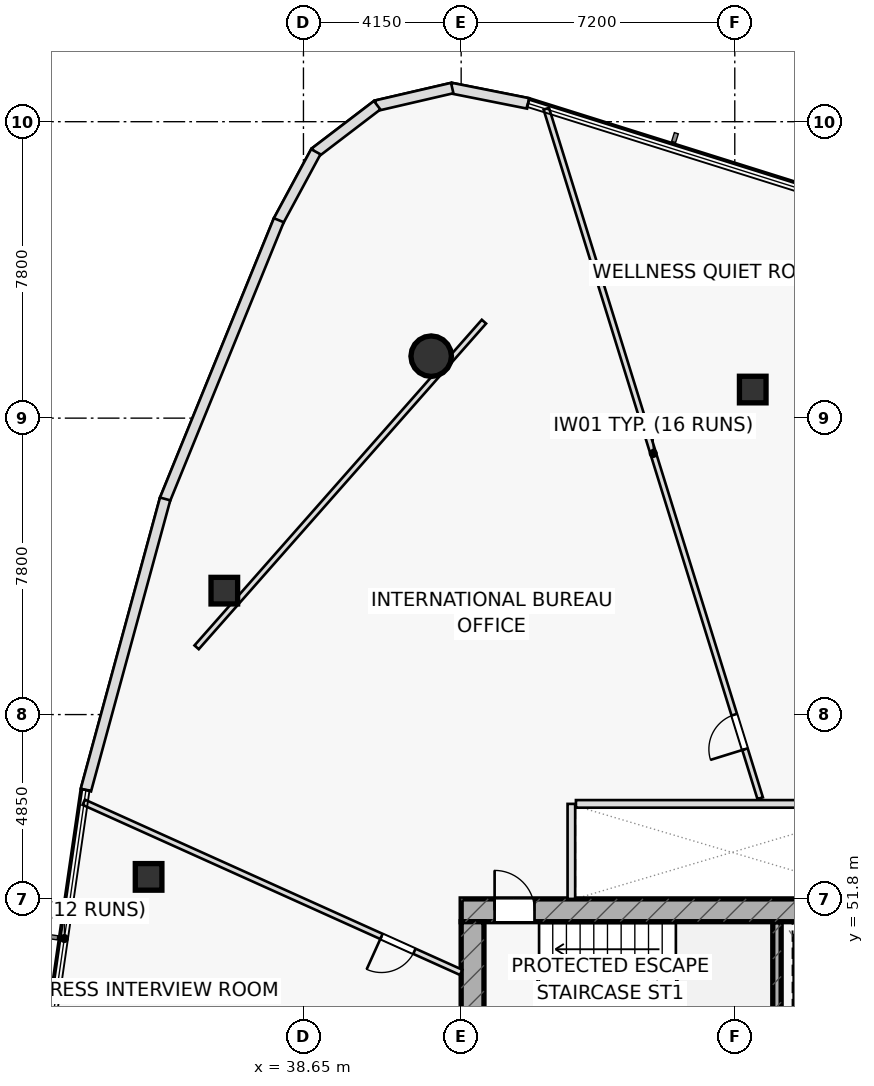
"""IFC4 building model, lengths in metres.
Left out: names, types, materials, properties, quantities, classifications, styles, units other than length and angle.
Written with IfcOpenShell. Run it as: python <this file> out.ifc"""

import sys

from ifc_helpers import new_model, si_unit, direction, frame, frame_2d, origin, origin_2d, place, context, subcontext, project, spatial, rectangle, hollow_rectangle, hollow_circle, extrude, element, fill, save


model = new_model("IFC4")
c1 = context("Model", 3, precision=1e-05, world=origin(), true_north=direction((0.0, 1.0)))
c2 = subcontext(c1, "Body", "Model", "MODEL_VIEW")
j1 = project(units=[si_unit("LENGTHUNIT", "METRE"), si_unit("PLANEANGLEUNIT", "RADIAN")], contexts=[c1])
p1 = place(None, origin())
s1 = spatial("IfcSite", under=j1, at=p1, CompositionType="ELEMENT")
p2 = place(p1, origin())
s2 = spatial("IfcBuilding", under=s1, at=p2, CompositionType="ELEMENT")
p3 = place(p2, frame((0.0, 0.0, 138.7)))
s3 = spatial("IfcBuildingStorey", under=s2, at=p3, CompositionType="ELEMENT", Elevation=138.7)
p4 = place(p3, frame((51.11, 48.1, 0.0), z_axis=(0.0, 0.0, 1.0), x_axis=(0.0, 1.0, 0.0)))
e1 = element("IfcWall", 1, at=p4, inside=s3, PredefinedType="SHEAR", context=c2, shape_type="SweptSolid", body=[
    extrude(rectangle(XDim=3.1, YDim=0.22, at=frame_2d((1.55, 0.0))), origin(), (0.0, 0.0, 1.0), 3.55),
])
p5 = place(p3, frame((42.8, 51.5, 0.0), z_axis=(0.0, 0.0, 1.0), x_axis=(1.0, 0.0, 0.0)))
e2 = element("IfcWall", 2, at=p5, inside=s3, PredefinedType="SHEAR", context=c2, shape_type="SweptSolid", body=[
    extrude(rectangle(XDim=14.4, YDim=0.6, at=frame_2d((7.2, 0.0))), origin(), (0.0, 0.0, 1.0), 3.55),
])
p6 = place(p5, frame((0.88, 0.0, 0.0)))
e3 = element("IfcOpeningElement", 3, at=p6, cuts=e2, PredefinedType="OPENING", context=c2, shape_type="SweptSolid", body=[
    extrude(rectangle(XDim=1.05, YDim=2.2, at=frame_2d((0.525, 1.1))), frame((0.0, 0.31, 0.0), z_axis=(0.0, -1.0, 0.0), x_axis=(1.0, 0.0, 0.0)), (0.0, 0.0, 1.0), 0.62),
])
p7 = place(p3, frame((43.1, 38.8, 0.0), z_axis=(0.0, 0.0, 1.0), x_axis=(0.0, 1.0, 0.0)))
e4 = element("IfcWall", 4, at=p7, inside=s3, PredefinedType="SHEAR", context=c2, shape_type="SweptSolid", body=[
    extrude(rectangle(XDim=12.4, YDim=0.6, at=frame_2d((6.2, 0.0))), origin(), (0.0, 0.0, 1.0), 3.55),
])
p8 = place(p3, frame((42.011, 66.08, 0.0), z_axis=(0.0, 0.0, 1.0), x_axis=(1.0, 0.0, 0.0)))
e5 = element("IfcColumn", 5, at=p8, inside=s3, PredefinedType="COLUMN", context=c2, shape_type="SweptSolid", body=[
    extrude(hollow_circle(Radius=0.533, WallThickness=0.045, at=origin_2d()), origin(), (0.0, 0.0, 1.0), 3.55),
])
for number, where, z_axis, x_axis in (
    (6, (36.568, 59.911, 0.0), (0.0, 0.0, 1.0), (1.0, 0.0, 0.0)),
    (7, (34.575, 52.379, 0.0), (0.0, 0.0, 1.0), (1.0, 0.0, 0.0)),
    (8, (50.472, 65.202, 0.0), (0.0, 0.0, 1.0), (1.0, 0.0, 0.0)),
):
    element("IfcColumn", number, at=place(p3, frame(where, z_axis=z_axis, x_axis=x_axis)), inside=s3, PredefinedType="COLUMN", context=c2, shape_type="SweptSolid", body=[
        extrude(hollow_rectangle(XDim=0.7, YDim=0.7, WallThickness=0.04, at=origin_2d()), origin(), (0.0, 0.0, 1.0), 3.55),
    ])
p9 = place(p3, frame((45.7, 51.8, 0.0), z_axis=(0.0, 0.0, 1.0), x_axis=(0.0, 1.0, 0.0)))
e9 = element("IfcWall", 9, at=p9, inside=s3, PredefinedType="PARTITIONING", context=c2, shape_type="SweptSolid", body=[
    extrude(rectangle(XDim=2.5, YDim=0.2, at=frame_2d((1.25, 0.0))), origin(), (0.0, 0.0, 1.0), 3.55),
])
p10 = place(p3, frame((43.4, 66.989, 0.0), z_axis=(0.0, 0.0, 1.0), x_axis=(-0.661622343701, -0.749837231881, 0.0)))
e10 = element("IfcWall", 10, at=p10, inside=s3, PredefinedType="PARTITIONING", context=c2, shape_type="SweptSolid", body=[
    extrude(rectangle(XDim=11.427, YDim=0.15, at=frame_2d((5.714, 0.0))), origin(), (0.0, 0.0, 1.0), 2.835),
])
p11 = place(p3, frame((50.668, 54.45, 0.0), z_axis=(0.0, 0.0, 1.0), x_axis=(-0.29631148368, 0.955091359316, 0.0)))
e11 = element("IfcWall", 11, at=p11, inside=s3, PredefinedType="PARTITIONING", context=c2, shape_type="SweptSolid", body=[
    extrude(rectangle(XDim=18.994, YDim=0.15, at=frame_2d((9.497, 0.0))), origin(), (0.0, 0.0, 1.0), 2.975),
])
p12 = place(p11, frame((1.35, 0.0, 0.0)))
e12 = element("IfcOpeningElement", 12, at=p12, cuts=e11, PredefinedType="OPENING", context=c2, shape_type="SweptSolid", body=[
    extrude(rectangle(XDim=0.95, YDim=2.05, at=frame_2d((0.475, 1.025))), frame((0.0, 0.085, 0.0), z_axis=(0.0, -1.0, 0.0), x_axis=(1.0, 0.0, 0.0)), (0.0, 0.0, 1.0), 0.17),
])
p13 = place(p3, frame((42.8, 49.867, 0.0), z_axis=(0.0, 0.0, 1.0), x_axis=(-0.911695751271, 0.410865984372, 0.0)))
e13 = element("IfcWall", 13, at=p13, inside=s3, PredefinedType="PARTITIONING", context=c2, shape_type="SweptSolid", body=[
    extrude(rectangle(XDim=10.893, YDim=0.15, at=frame_2d((5.447, 0.0))), origin(), (0.0, 0.0, 1.0), 2.835),
])
p14 = place(p13, frame((1.35, 0.0, 0.0)))
e14 = element("IfcOpeningElement", 14, at=p14, cuts=e13, PredefinedType="OPENING", context=c2, shape_type="SweptSolid", body=[
    extrude(rectangle(XDim=0.95, YDim=2.05, at=frame_2d((0.475, 1.025))), frame((0.0, 0.085, 0.0), z_axis=(0.0, -1.0, 0.0), x_axis=(1.0, 0.0, 0.0)), (0.0, 0.0, 1.0), 0.17),
])
p15 = place(p3, frame((44.562, 72.731, 0.0), z_axis=(0.0, 0.0, 1.0), x_axis=(-0.98078915881, 0.195070822936, 0.0)))
e15 = element("IfcWall", 15, at=p15, inside=s3, PredefinedType="STANDARD", context=c2, shape_type="SweptSolid", body=[
    extrude(rectangle(XDim=2.066, YDim=0.28, at=frame_2d((1.033, 0.0))), origin(), (0.0, 0.0, 1.0), 3.55),
])
for number, where, z_axis, x_axis in (
    (16, (42.565, 73.135, 0.0), (0.0, 0.0, 1.0), (-0.974, -0.226, 0.0)),
    (17, (40.589, 72.683, 0.0), (0.0, 0.0, 1.0), (-0.795, -0.607, 0.0)),
):
    element("IfcWall", number, at=place(p3, frame(where, z_axis=z_axis, x_axis=x_axis)), inside=s3, PredefinedType="STANDARD", context=c2, shape_type="SweptSolid", body=[
        extrude(rectangle(XDim=2.055, YDim=0.28, at=frame_2d((1.027, 0.0))), origin(), (0.0, 0.0, 1.0), 3.55),
    ])
p16 = place(p3, frame((38.975, 71.459, 0.0), z_axis=(0.0, 0.0, 1.0), x_axis=(-0.47482857354, -0.880078306601, 0.0)))
e18 = element("IfcWall", 18, at=p16, inside=s3, PredefinedType="STANDARD", context=c2, shape_type="SweptSolid", body=[
    extrude(rectangle(XDim=2.077, YDim=0.28, at=frame_2d((1.039, 0.0))), origin(), (0.0, 0.0, 1.0), 3.55),
])
p17 = place(p3, frame((38.001, 69.658, 0.0), z_axis=(0.0, 0.0, 1.0), x_axis=(-0.377471486731, -0.926021207481, 0.0)))
e19 = element("IfcWall", 19, at=p17, inside=s3, PredefinedType="STANDARD", context=c2, shape_type="SweptSolid", body=[
    extrude(rectangle(XDim=7.95, YDim=0.28, at=frame_2d((3.975, 0.0))), origin(), (0.0, 0.0, 1.0), 3.55),
])
p18 = place(p3, frame((35.01, 62.324, 0.0), z_axis=(0.0, 0.0, 1.0), x_axis=(-0.262651548334, -0.964890752447, 0.0)))
e20 = element("IfcWall", 20, at=p18, inside=s3, PredefinedType="STANDARD", context=c2, shape_type="SweptSolid", body=[
    extrude(rectangle(XDim=7.938, YDim=0.28, at=frame_2d((3.969, 0.0))), origin(), (0.0, 0.0, 1.0), 3.55),
])
p19 = place(p3, frame((45.82, 54.3, 0.0), z_axis=(0.0, 0.0, 1.0), x_axis=(1.0, 0.0, 0.0)))
e21 = element("IfcWall", 21, at=p19, inside=s3, PredefinedType="PARTITIONING", context=c2, shape_type="SweptSolid", body=[
    extrude(rectangle(XDim=8.31, YDim=0.2, at=frame_2d((4.155, 0.0))), origin(), (0.0, 0.0, 1.0), 3.55),
])
p20 = place(p6, origin())
e22 = element("IfcDoor", 22, at=p20, inside=s3, OperationType="SINGLE_SWING_LEFT", PredefinedType="DOOR", context=c2, shape_type="SweptSolid", body=[
    extrude(rectangle(XDim=1.05, YDim=2.2, at=frame_2d((0.525, 1.1))), frame((0.0, 0.025, 0.0), z_axis=(0.0, -1.0, 0.0), x_axis=(1.0, 0.0, 0.0)), (0.0, 0.0, 1.0), 0.05),
])
fill(e3, e22)
p21 = place(p12, origin())
e23 = element("IfcDoor", 23, at=p21, inside=s3, OperationType="SINGLE_SWING_LEFT", PredefinedType="DOOR", context=c2, shape_type="SweptSolid", body=[
    extrude(rectangle(XDim=0.95, YDim=2.05, at=frame_2d((0.475, 1.025))), frame((0.0, 0.025, 0.0), z_axis=(0.0, -1.0, 0.0), x_axis=(1.0, 0.0, 0.0)), (0.0, 0.0, 1.0), 0.05),
])
fill(e12, e23)
p22 = place(p14, origin())
e24 = element("IfcDoor", 24, at=p22, inside=s3, OperationType="SINGLE_SWING_RIGHT", PredefinedType="DOOR", context=c2, shape_type="SweptSolid", body=[
    extrude(rectangle(XDim=0.95, YDim=2.05, at=frame_2d((0.475, 1.025))), frame((0.0, 0.025, 0.0), z_axis=(0.0, -1.0, 0.0), x_axis=(1.0, 0.0, 0.0)), (0.0, 0.0, 1.0), 0.05),
])
fill(e14, e24)
save(model, sys.argv[1])
